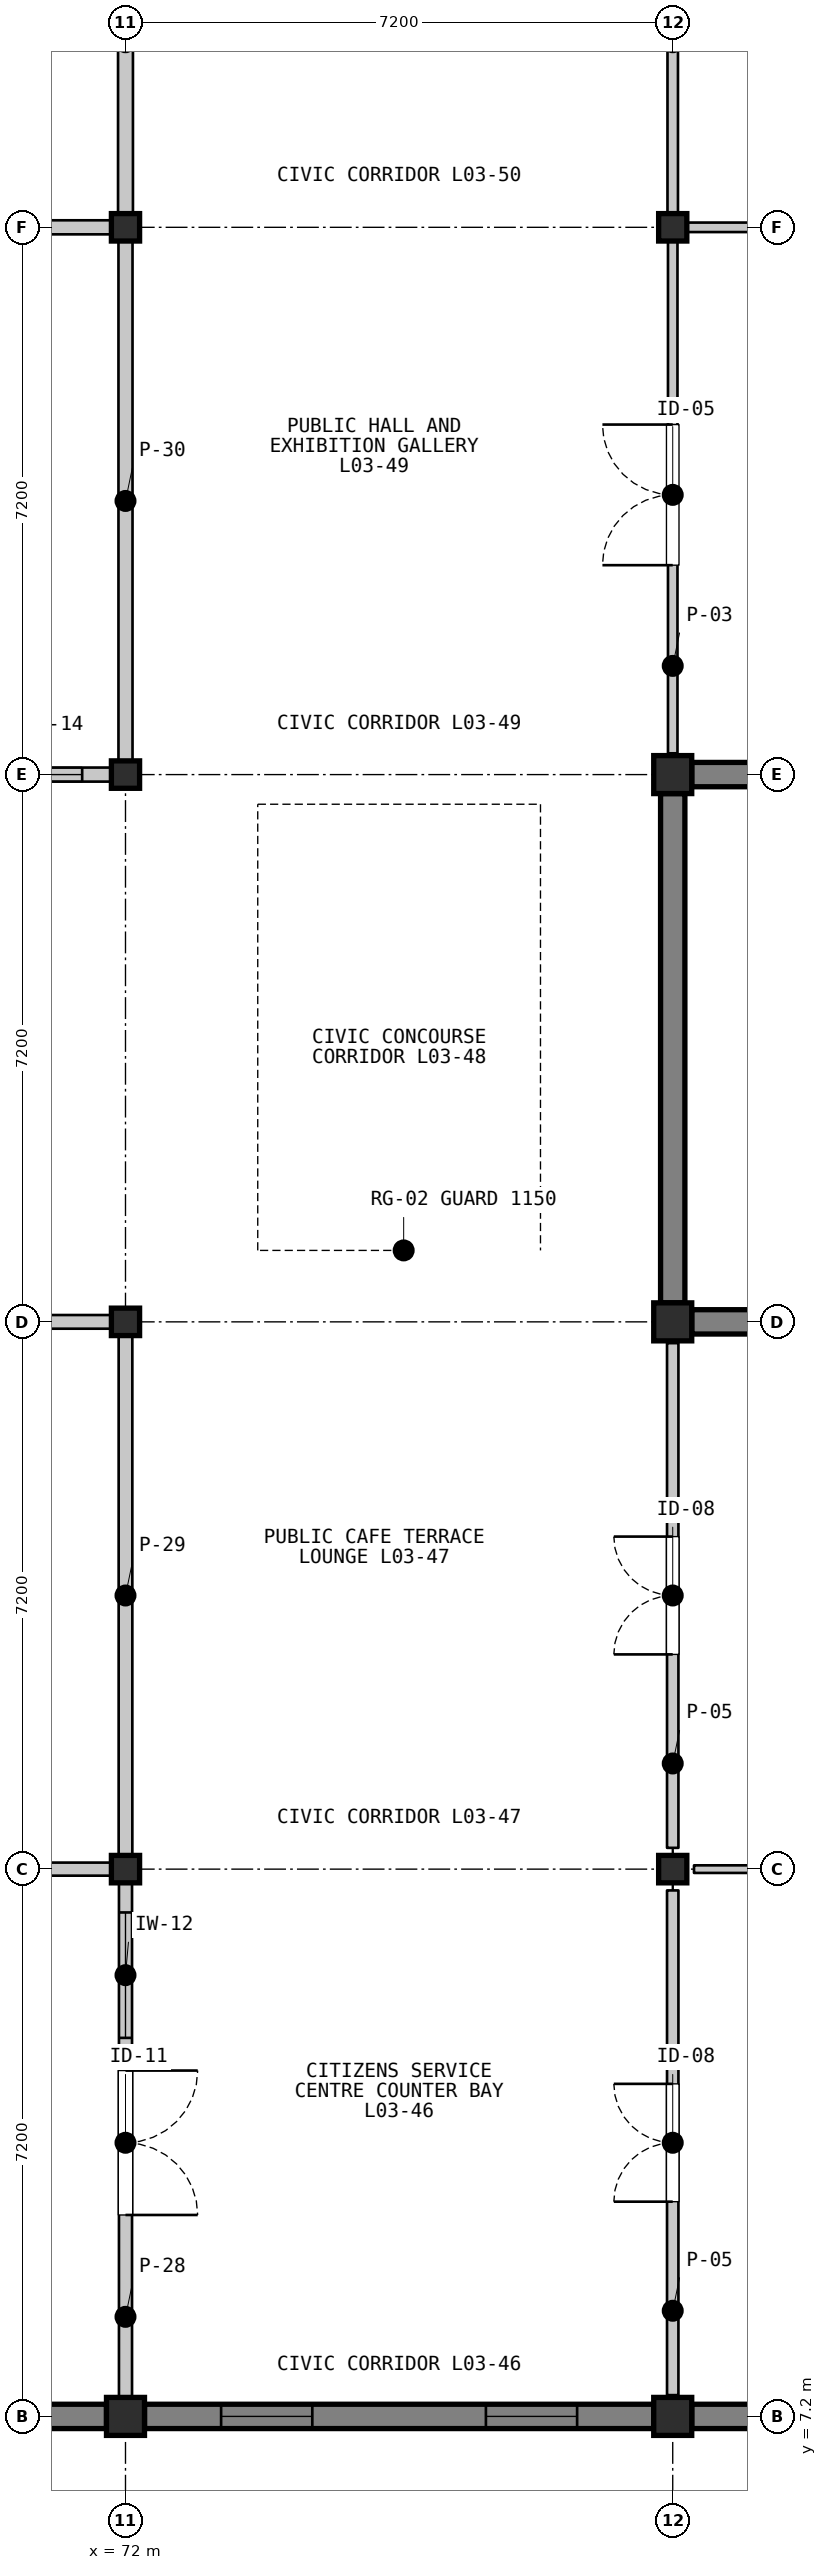
"""IFC4 building model, lengths in metres.
Left out: names, types, materials, properties, quantities, classifications, styles, units other than length and angle.
Written with IfcOpenShell. Run it as: python <this file> out.ifc"""

import sys

from ifc_helpers import new_model, si_unit, direction, frame, frame_2d, origin, origin_2d, place, context, subcontext, project, spatial, rectangle, i_section, extrude, element, fill, save


model = new_model("IFC4")
c1 = context("Model", 3, precision=1e-05, world=origin(), true_north=direction((0.0, 1.0)))
c2 = subcontext(c1, "Body", "Model", "MODEL_VIEW")
j1 = project(units=[si_unit("LENGTHUNIT", "METRE"), si_unit("PLANEANGLEUNIT", "RADIAN")], contexts=[c1])
p1 = place(None, origin())
s1 = spatial("IfcSite", under=j1, at=p1, CompositionType="ELEMENT")
p2 = place(p1, origin())
s2 = spatial("IfcBuilding", under=s1, at=p2, CompositionType="ELEMENT")
p3 = place(p2, frame((0.0, 0.0, 9.9)))
s3 = spatial("IfcBuildingStorey", under=s2, at=p3, CompositionType="ELEMENT", Elevation=9.9)
p4 = place(p3, frame((72.0, 7.2, 0.0), z_axis=(0.0, 0.0, 1.0), x_axis=(1.0, 0.0, 0.0)))
e1 = element("IfcColumn", 1, at=p4, inside=s3, PredefinedType="COLUMN", context=c2, shape_type="SweptSolid", body=[
    extrude(rectangle(XDim=0.5, YDim=0.5, at=origin_2d()), origin(), (0.0, 0.0, 1.0), 4.2),
])
for number, where, z_axis, x_axis in (
    (2, (72.0, 14.4, 0.0), (0.0, 0.0, 1.0), (1.0, 0.0, 0.0)),
    (3, (72.0, 21.6, 0.0), (0.0, 0.0, 1.0), (1.0, 0.0, 0.0)),
    (4, (72.0, 28.8, 0.0), (0.0, 0.0, 1.0), (1.0, 0.0, 0.0)),
    (5, (72.0, 36.0, 0.0), (0.0, 0.0, 1.0), (1.0, 0.0, 0.0)),
):
    element("IfcColumn", number, at=place(p3, frame(where, z_axis=z_axis, x_axis=x_axis)), inside=s3, PredefinedType="COLUMN", context=c2, shape_type="SweptSolid", body=[
        extrude(i_section(OverallWidth=0.371, OverallDepth=0.361, WebThickness=0.012, FlangeThickness=0.02, FilletRadius=0.015, at=origin_2d()), origin(), (0.0, 0.0, 1.0), 4.2),
    ])
p5 = place(p3, frame((79.2, 7.2, 0.0), z_axis=(0.0, 0.0, 1.0), x_axis=(1.0, 0.0, 0.0)))
e6 = element("IfcColumn", 6, at=p5, inside=s3, PredefinedType="COLUMN", context=c2, shape_type="SweptSolid", body=[
    extrude(rectangle(XDim=0.5, YDim=0.5, at=origin_2d()), origin(), (0.0, 0.0, 1.0), 4.2),
])
p6 = place(p3, frame((79.2, 14.4, 0.0), z_axis=(0.0, 0.0, 1.0), x_axis=(1.0, 0.0, 0.0)))
e7 = element("IfcColumn", 7, at=p6, inside=s3, PredefinedType="COLUMN", context=c2, shape_type="SweptSolid", body=[
    extrude(i_section(OverallWidth=0.371, OverallDepth=0.361, WebThickness=0.012, FlangeThickness=0.02, FilletRadius=0.015, at=origin_2d()), origin(), (0.0, 0.0, 1.0), 4.2),
])
for number, where, z_axis, x_axis in (
    (8, (79.2, 21.6, 0.0), (0.0, 0.0, 1.0), (1.0, 0.0, 0.0)),
    (9, (79.2, 28.8, 0.0), (0.0, 0.0, 1.0), (1.0, 0.0, 0.0)),
):
    element("IfcColumn", number, at=place(p3, frame(where, z_axis=z_axis, x_axis=x_axis)), inside=s3, PredefinedType="COLUMN", context=c2, shape_type="SweptSolid", body=[
        extrude(rectangle(XDim=0.5, YDim=0.5, at=origin_2d()), origin(), (0.0, 0.0, 1.0), 4.2),
    ])
p7 = place(p3, frame((79.2, 36.0, 0.0), z_axis=(0.0, 0.0, 1.0), x_axis=(1.0, 0.0, 0.0)))
e10 = element("IfcColumn", 10, at=p7, inside=s3, PredefinedType="COLUMN", context=c2, shape_type="SweptSolid", body=[
    extrude(i_section(OverallWidth=0.371, OverallDepth=0.361, WebThickness=0.012, FlangeThickness=0.02, FilletRadius=0.015, at=origin_2d()), origin(), (0.0, 0.0, 1.0), 4.2),
])
p8 = place(p3, frame((71.75, 7.2, 0.0), z_axis=(0.0, 0.0, 1.0), x_axis=(-1.0, 0.0, 0.0)))
e11 = element("IfcWall", 11, at=p8, inside=s3, PredefinedType="SOLIDWALL", context=c2, shape_type="SweptSolid", body=[
    extrude(rectangle(XDim=6.7, YDim=0.32, at=frame_2d((3.35, 0.0))), origin(), (0.0, 0.0, 1.0), 3.418),
])
p9 = place(p8, frame((1.008, 0.0, 0.95)))
e12 = element("IfcOpeningElement", 12, at=p9, cuts=e11, PredefinedType="OPENING", context=c2, shape_type="SweptSolid", body=[
    extrude(rectangle(XDim=1.2, YDim=1.7, at=frame_2d((0.6, 0.85))), frame((0.0, 0.17, 0.0), z_axis=(0.0, -1.0, 0.0), x_axis=(1.0, 0.0, 0.0)), (0.0, 0.0, 1.0), 0.34),
])
p10 = place(p8, frame((4.492, 0.0, 0.95)))
e13 = element("IfcOpeningElement", 13, at=p10, cuts=e11, PredefinedType="OPENING", context=c2, shape_type="SweptSolid", body=[
    extrude(rectangle(XDim=1.2, YDim=1.7, at=frame_2d((0.6, 0.85))), frame((0.0, 0.17, 0.0), z_axis=(0.0, -1.0, 0.0), x_axis=(1.0, 0.0, 0.0)), (0.0, 0.0, 1.0), 0.34),
])
p11 = place(p3, frame((78.95, 7.2, 0.0), z_axis=(0.0, 0.0, 1.0), x_axis=(-1.0, 0.0, 0.0)))
e14 = element("IfcWall", 14, at=p11, inside=s3, PredefinedType="SOLIDWALL", context=c2, shape_type="SweptSolid", body=[
    extrude(rectangle(XDim=6.7, YDim=0.32, at=frame_2d((3.35, 0.0))), origin(), (0.0, 0.0, 1.0), 3.418),
])
p12 = place(p11, frame((1.008, 0.0, 0.95)))
e15 = element("IfcOpeningElement", 15, at=p12, cuts=e14, PredefinedType="OPENING", context=c2, shape_type="SweptSolid", body=[
    extrude(rectangle(XDim=1.2, YDim=1.7, at=frame_2d((0.6, 0.85))), frame((0.0, 0.17, 0.0), z_axis=(0.0, -1.0, 0.0), x_axis=(1.0, 0.0, 0.0)), (0.0, 0.0, 1.0), 0.34),
])
p13 = place(p11, frame((4.492, 0.0, 0.95)))
e16 = element("IfcOpeningElement", 16, at=p13, cuts=e14, PredefinedType="OPENING", context=c2, shape_type="SweptSolid", body=[
    extrude(rectangle(XDim=1.2, YDim=1.7, at=frame_2d((0.6, 0.85))), frame((0.0, 0.17, 0.0), z_axis=(0.0, -1.0, 0.0), x_axis=(1.0, 0.0, 0.0)), (0.0, 0.0, 1.0), 0.34),
])
p14 = place(p3, frame((79.2, 28.55, 0.0), z_axis=(0.0, 0.0, 1.0), x_axis=(0.0, -1.0, 0.0)))
e17 = element("IfcWall", 17, at=p14, inside=s3, PredefinedType="SOLIDWALL", context=c2, shape_type="SweptSolid", body=[
    extrude(rectangle(XDim=6.7, YDim=0.32, at=frame_2d((3.35, 0.0))), origin(), (0.0, 0.0, 1.0), 3.487),
])
p15 = place(p3, frame((86.15, 7.2, 0.0), z_axis=(0.0, 0.0, 1.0), x_axis=(-1.0, 0.0, 0.0)))
e18 = element("IfcWall", 18, at=p15, inside=s3, PredefinedType="SOLIDWALL", context=c2, shape_type="SweptSolid", body=[
    extrude(rectangle(XDim=6.7, YDim=0.32, at=frame_2d((3.35, 0.0))), origin(), (0.0, 0.0, 1.0), 3.418),
])
p16 = place(p15, frame((1.008, 0.0, 0.95)))
e19 = element("IfcOpeningElement", 19, at=p16, cuts=e18, PredefinedType="OPENING", context=c2, shape_type="SweptSolid", body=[
    extrude(rectangle(XDim=1.2, YDim=1.7, at=frame_2d((0.6, 0.85))), frame((0.0, 0.17, 0.0), z_axis=(0.0, -1.0, 0.0), x_axis=(1.0, 0.0, 0.0)), (0.0, 0.0, 1.0), 0.34),
])
p17 = place(p15, frame((4.492, 0.0, 0.95)))
e20 = element("IfcOpeningElement", 20, at=p17, cuts=e18, PredefinedType="OPENING", context=c2, shape_type="SweptSolid", body=[
    extrude(rectangle(XDim=1.2, YDim=1.7, at=frame_2d((0.6, 0.85))), frame((0.0, 0.17, 0.0), z_axis=(0.0, -1.0, 0.0), x_axis=(1.0, 0.0, 0.0)), (0.0, 0.0, 1.0), 0.34),
])
p18 = place(p3, frame((79.45, 21.6, 0.0), z_axis=(0.0, 0.0, 1.0), x_axis=(1.0, 0.0, 0.0)))
e21 = element("IfcWall", 21, at=p18, inside=s3, PredefinedType="SOLIDWALL", context=c2, shape_type="SweptSolid", body=[
    extrude(rectangle(XDim=6.7, YDim=0.32, at=frame_2d((3.35, 0.0))), origin(), (0.0, 0.0, 1.0), 3.418),
])
p19 = place(p18, frame((0.908, 0.0, 0.95)))
e22 = element("IfcOpeningElement", 22, at=p19, cuts=e21, PredefinedType="OPENING", context=c2, shape_type="SweptSolid", body=[
    extrude(rectangle(XDim=1.4, YDim=2.1, at=frame_2d((0.7, 1.05))), frame((0.0, 0.17, 0.0), z_axis=(0.0, -1.0, 0.0), x_axis=(1.0, 0.0, 0.0)), (0.0, 0.0, 1.0), 0.34),
])
p20 = place(p18, frame((4.392, 0.0, 0.95)))
e23 = element("IfcOpeningElement", 23, at=p20, cuts=e21, PredefinedType="OPENING", context=c2, shape_type="SweptSolid", body=[
    extrude(rectangle(XDim=1.4, YDim=2.1, at=frame_2d((0.7, 1.05))), frame((0.0, 0.17, 0.0), z_axis=(0.0, -1.0, 0.0), x_axis=(1.0, 0.0, 0.0)), (0.0, 0.0, 1.0), 0.34),
])
p21 = place(p3, frame((86.15, 28.8, 0.0), z_axis=(0.0, 0.0, 1.0), x_axis=(-1.0, 0.0, 0.0)))
e24 = element("IfcWall", 24, at=p21, inside=s3, PredefinedType="SOLIDWALL", context=c2, shape_type="SweptSolid", body=[
    extrude(rectangle(XDim=6.7, YDim=0.32, at=frame_2d((3.35, 0.0))), origin(), (0.0, 0.0, 1.0), 3.418),
])
p22 = place(p21, frame((1.008, 0.0, 0.95)))
e25 = element("IfcOpeningElement", 25, at=p22, cuts=e24, PredefinedType="OPENING", context=c2, shape_type="SweptSolid", body=[
    extrude(rectangle(XDim=1.2, YDim=1.7, at=frame_2d((0.6, 0.85))), frame((0.0, 0.17, 0.0), z_axis=(0.0, -1.0, 0.0), x_axis=(1.0, 0.0, 0.0)), (0.0, 0.0, 1.0), 0.34),
])
p23 = place(p21, frame((4.492, 0.0, 0.95)))
e26 = element("IfcOpeningElement", 26, at=p23, cuts=e24, PredefinedType="OPENING", context=c2, shape_type="SweptSolid", body=[
    extrude(rectangle(XDim=1.2, YDim=1.7, at=frame_2d((0.6, 0.85))), frame((0.0, 0.17, 0.0), z_axis=(0.0, -1.0, 0.0), x_axis=(1.0, 0.0, 0.0)), (0.0, 0.0, 1.0), 0.34),
])
p24 = place(p3, frame((72.0, 14.28, 0.0), z_axis=(0.0, 0.0, 1.0), x_axis=(0.0, -1.0, 0.0)))
e27 = element("IfcWall", 27, at=p24, inside=s3, PredefinedType="PARTITIONING", context=c2, shape_type="SweptSolid", body=[
    extrude(rectangle(XDim=6.96, YDim=0.172, at=frame_2d((3.48, 0.0))), origin(), (0.0, 0.0, 1.0), 3.408),
])
p25 = place(p24, frame((2.53, 0.0, 0.0)))
e28 = element("IfcOpeningElement", 28, at=p25, cuts=e27, PredefinedType="OPENING", context=c2, shape_type="SweptSolid", body=[
    extrude(rectangle(XDim=1.9, YDim=2.45, at=frame_2d((0.95, 1.225))), frame((0.0, 0.096, 0.0), z_axis=(0.0, -1.0, 0.0), x_axis=(1.0, 0.0, 0.0)), (0.0, 0.0, 1.0), 0.192),
])
p26 = place(p24, frame((0.45, 0.0, 1.05)))
e29 = element("IfcOpeningElement", 29, at=p26, cuts=e27, PredefinedType="OPENING", context=c2, shape_type="SweptSolid", body=[
    extrude(rectangle(XDim=1.65, YDim=1.15, at=frame_2d((0.825, 0.575))), frame((0.0, 0.096, 0.0), z_axis=(0.0, -1.0, 0.0), x_axis=(1.0, 0.0, 0.0)), (0.0, 0.0, 1.0), 0.192),
])
p27 = place(p3, frame((64.92, 14.4, 0.0), z_axis=(0.0, 0.0, 1.0), x_axis=(1.0, 0.0, 0.0)))
e30 = element("IfcWall", 30, at=p27, inside=s3, PredefinedType="PARTITIONING", context=c2, shape_type="SweptSolid", body=[
    extrude(rectangle(XDim=6.96, YDim=0.172, at=frame_2d((3.48, 0.0))), origin(), (0.0, 0.0, 1.0), 3.408),
])
p28 = place(p3, frame((64.92, 21.6, 0.0), z_axis=(0.0, 0.0, 1.0), x_axis=(1.0, 0.0, 0.0)))
e31 = element("IfcWall", 31, at=p28, inside=s3, PredefinedType="PARTITIONING", context=c2, shape_type="SweptSolid", body=[
    extrude(rectangle(XDim=6.96, YDim=0.18, at=frame_2d((3.48, 0.0))), origin(), (0.0, 0.0, 1.0), 3.408),
])
p29 = place(p28, frame((2.705, 0.0, 0.0)))
e32 = element("IfcOpeningElement", 32, at=p29, cuts=e31, PredefinedType="OPENING", context=c2, shape_type="SweptSolid", body=[
    extrude(rectangle(XDim=1.55, YDim=2.3, at=frame_2d((0.775, 1.15))), frame((0.0, 0.1, 0.0), z_axis=(0.0, -1.0, 0.0), x_axis=(1.0, 0.0, 0.0)), (0.0, 0.0, 1.0), 0.2),
])
p30 = place(p28, frame((0.45, 0.0, 1.05)))
e33 = element("IfcOpeningElement", 33, at=p30, cuts=e31, PredefinedType="OPENING", context=c2, shape_type="SweptSolid", body=[
    extrude(rectangle(XDim=1.7, YDim=1.18, at=frame_2d((0.85, 0.59))), frame((0.0, 0.1, 0.0), z_axis=(0.0, -1.0, 0.0), x_axis=(1.0, 0.0, 0.0)), (0.0, 0.0, 1.0), 0.2),
])
p31 = place(p3, frame((72.0, 21.48, 0.0), z_axis=(0.0, 0.0, 1.0), x_axis=(0.0, -1.0, 0.0)))
e34 = element("IfcWall", 34, at=p31, inside=s3, PredefinedType="PARTITIONING", context=c2, shape_type="SweptSolid", body=[
    extrude(rectangle(XDim=6.96, YDim=0.18, at=frame_2d((3.48, 0.0))), origin(), (0.0, 0.0, 1.0), 3.408),
])
p32 = place(p3, frame((71.88, 28.8, 0.0), z_axis=(0.0, 0.0, 1.0), x_axis=(-1.0, 0.0, 0.0)))
e35 = element("IfcWall", 35, at=p32, inside=s3, PredefinedType="PARTITIONING", context=c2, shape_type="SweptSolid", body=[
    extrude(rectangle(XDim=6.96, YDim=0.185, at=frame_2d((3.48, 0.0))), origin(), (0.0, 0.0, 1.0), 3.408),
])
p33 = place(p32, frame((2.705, 0.0, 0.0)))
e36 = element("IfcOpeningElement", 36, at=p33, cuts=e35, PredefinedType="OPENING", context=c2, shape_type="SweptSolid", body=[
    extrude(rectangle(XDim=1.55, YDim=2.3, at=frame_2d((0.775, 1.15))), frame((0.0, 0.103, 0.0), z_axis=(0.0, -1.0, 0.0), x_axis=(1.0, 0.0, 0.0)), (0.0, 0.0, 1.0), 0.205),
])
p34 = place(p32, frame((0.45, 0.0, 1.05)))
e37 = element("IfcOpeningElement", 37, at=p34, cuts=e35, PredefinedType="OPENING", context=c2, shape_type="SweptSolid", body=[
    extrude(rectangle(XDim=1.75, YDim=1.18, at=frame_2d((0.875, 0.59))), frame((0.0, 0.103, 0.0), z_axis=(0.0, -1.0, 0.0), x_axis=(1.0, 0.0, 0.0)), (0.0, 0.0, 1.0), 0.205),
])
for number, where, z_axis, x_axis in (
    (38, (64.92, 36.0, 0.0), (0.0, 0.0, 1.0), (1.0, 0.0, 0.0)),
    (39, (72.0, 35.88, 0.0), (0.0, 0.0, 1.0), (0.0, -1.0, 0.0)),
):
    element("IfcWall", number, at=place(p3, frame(where, z_axis=z_axis, x_axis=x_axis)), inside=s3, PredefinedType="PARTITIONING", context=c2, shape_type="SweptSolid", body=[
        extrude(rectangle(XDim=6.96, YDim=0.185, at=frame_2d((3.48, 0.0))), origin(), (0.0, 0.0, 1.0), 3.408),
    ])
p35 = place(p3, frame((72.0, 43.08, 0.0), z_axis=(0.0, 0.0, 1.0), x_axis=(0.0, -1.0, 0.0)))
e40 = element("IfcWall", 40, at=p35, inside=s3, PredefinedType="PARTITIONING", context=c2, shape_type="SweptSolid", body=[
    extrude(rectangle(XDim=6.96, YDim=0.196, at=frame_2d((3.48, 0.0))), origin(), (0.0, 0.0, 1.0), 3.408),
])
p36 = place(p3, frame((79.2, 7.48, 0.0), z_axis=(0.0, 0.0, 1.0), x_axis=(0.0, 1.0, 0.0)))
e41 = element("IfcWall", 41, at=p36, inside=s3, PredefinedType="PARTITIONING", context=c2, shape_type="SweptSolid", body=[
    extrude(rectangle(XDim=6.64, YDim=0.15, at=frame_2d((3.32, 0.0))), origin(), (0.0, 0.0, 1.0), 3.477),
])
p37 = place(p36, frame((2.545, 0.0, 0.0)))
e42 = element("IfcOpeningElement", 42, at=p37, cuts=e41, PredefinedType="OPENING", context=c2, shape_type="SweptSolid", body=[
    extrude(rectangle(XDim=1.55, YDim=2.3, at=frame_2d((0.775, 1.15))), frame((0.0, 0.085, 0.0), z_axis=(0.0, -1.0, 0.0), x_axis=(1.0, 0.0, 0.0)), (0.0, 0.0, 1.0), 0.17),
])
p38 = place(p3, frame((79.48, 14.4, 0.0), z_axis=(0.0, 0.0, 1.0), x_axis=(1.0, 0.0, 0.0)))
e43 = element("IfcWall", 43, at=p38, inside=s3, PredefinedType="PARTITIONING", context=c2, shape_type="SweptSolid", body=[
    extrude(rectangle(XDim=6.64, YDim=0.1, at=frame_2d((3.32, 0.0))), origin(), (0.0, 0.0, 1.0), 3.408),
])
p39 = place(p3, frame((79.2, 14.68, 0.0), z_axis=(0.0, 0.0, 1.0), x_axis=(0.0, 1.0, 0.0)))
e44 = element("IfcWall", 44, at=p39, inside=s3, PredefinedType="PARTITIONING", context=c2, shape_type="SweptSolid", body=[
    extrude(rectangle(XDim=6.64, YDim=0.15, at=frame_2d((3.32, 0.0))), origin(), (0.0, 0.0, 1.0), 3.477),
])
p40 = place(p39, frame((2.545, 0.0, 0.0)))
e45 = element("IfcOpeningElement", 45, at=p40, cuts=e44, PredefinedType="OPENING", context=c2, shape_type="SweptSolid", body=[
    extrude(rectangle(XDim=1.55, YDim=2.3, at=frame_2d((0.775, 1.15))), frame((0.0, 0.085, 0.0), z_axis=(0.0, -1.0, 0.0), x_axis=(1.0, 0.0, 0.0)), (0.0, 0.0, 1.0), 0.17),
])
p41 = place(p3, frame((79.2, 29.08, 0.0), z_axis=(0.0, 0.0, 1.0), x_axis=(0.0, 1.0, 0.0)))
e46 = element("IfcWall", 46, at=p41, inside=s3, PredefinedType="PARTITIONING", context=c2, shape_type="SweptSolid", body=[
    extrude(rectangle(XDim=6.8, YDim=0.125, at=frame_2d((3.4, 0.0))), origin(), (0.0, 0.0, 1.0), 3.408),
])
p42 = place(p41, frame((2.475, 0.0, 0.0)))
e47 = element("IfcOpeningElement", 47, at=p42, cuts=e46, PredefinedType="OPENING", context=c2, shape_type="SweptSolid", body=[
    extrude(rectangle(XDim=1.85, YDim=2.45, at=frame_2d((0.925, 1.225))), frame((0.0, 0.073, 0.0), z_axis=(0.0, -1.0, 0.0), x_axis=(1.0, 0.0, 0.0)), (0.0, 0.0, 1.0), 0.145),
])
p43 = place(p3, frame((79.32, 36.0, 0.0), z_axis=(0.0, 0.0, 1.0), x_axis=(1.0, 0.0, 0.0)))
e48 = element("IfcWall", 48, at=p43, inside=s3, PredefinedType="PARTITIONING", context=c2, shape_type="SweptSolid", body=[
    extrude(rectangle(XDim=6.96, YDim=0.125, at=frame_2d((3.48, 0.0))), origin(), (0.0, 0.0, 1.0), 3.408),
])
p44 = place(p3, frame((79.2, 36.12, 0.0), z_axis=(0.0, 0.0, 1.0), x_axis=(0.0, 1.0, 0.0)))
e49 = element("IfcWall", 49, at=p44, inside=s3, PredefinedType="PARTITIONING", context=c2, shape_type="SweptSolid", body=[
    extrude(rectangle(XDim=6.8, YDim=0.138, at=frame_2d((3.4, 0.0))), origin(), (0.0, 0.0, 1.0), 3.408),
])
p45 = place(p12, origin())
e50 = element("IfcWindow", 50, at=p45, inside=s3, PartitioningType="SINGLE_PANEL", PredefinedType="WINDOW", context=c2, shape_type="SweptSolid", body=[
    extrude(rectangle(XDim=1.2, YDim=1.7, at=frame_2d((0.6, 0.85))), frame((0.0, 0.03, 0.0), z_axis=(0.0, -1.0, 0.0), x_axis=(1.0, 0.0, 0.0)), (0.0, 0.0, 1.0), 0.06),
])
fill(e15, e50)
p46 = place(p13, origin())
e51 = element("IfcWindow", 51, at=p46, inside=s3, PartitioningType="SINGLE_PANEL", PredefinedType="WINDOW", context=c2, shape_type="SweptSolid", body=[
    extrude(rectangle(XDim=1.2, YDim=1.7, at=frame_2d((0.6, 0.85))), frame((0.0, 0.03, 0.0), z_axis=(0.0, -1.0, 0.0), x_axis=(1.0, 0.0, 0.0)), (0.0, 0.0, 1.0), 0.06),
])
fill(e16, e51)
p47 = place(p25, origin())
e52 = element("IfcDoor", 52, at=p47, inside=s3, OperationType="DOUBLE_DOOR_SINGLE_SWING", PredefinedType="DOOR", context=c2, shape_type="SweptSolid", body=[
    extrude(rectangle(XDim=1.9, YDim=2.45, at=frame_2d((0.95, 1.225))), frame((0.0, 0.025, 0.0), z_axis=(0.0, -1.0, 0.0), x_axis=(1.0, 0.0, 0.0)), (0.0, 0.0, 1.0), 0.05),
])
fill(e28, e52)
p48 = place(p26, origin())
e53 = element("IfcWindow", 53, at=p48, inside=s3, PartitioningType="SINGLE_PANEL", PredefinedType="WINDOW", context=c2, shape_type="SweptSolid", body=[
    extrude(rectangle(XDim=1.65, YDim=1.15, at=frame_2d((0.825, 0.575))), frame((0.0, 0.03, 0.0), z_axis=(0.0, -1.0, 0.0), x_axis=(1.0, 0.0, 0.0)), (0.0, 0.0, 1.0), 0.06),
])
fill(e29, e53)
p49 = place(p34, origin())
e54 = element("IfcWindow", 54, at=p49, inside=s3, PartitioningType="SINGLE_PANEL", PredefinedType="WINDOW", context=c2, shape_type="SweptSolid", body=[
    extrude(rectangle(XDim=1.75, YDim=1.18, at=frame_2d((0.875, 0.59))), frame((0.0, 0.03, 0.0), z_axis=(0.0, -1.0, 0.0), x_axis=(1.0, 0.0, 0.0)), (0.0, 0.0, 1.0), 0.06),
])
fill(e37, e54)
p50 = place(p37, origin())
e55 = element("IfcDoor", 55, at=p50, inside=s3, OperationType="DOUBLE_DOOR_SINGLE_SWING", PredefinedType="DOOR", context=c2, shape_type="SweptSolid", body=[
    extrude(rectangle(XDim=1.55, YDim=2.3, at=frame_2d((0.775, 1.15))), frame((0.0, 0.025, 0.0), z_axis=(0.0, -1.0, 0.0), x_axis=(1.0, 0.0, 0.0)), (0.0, 0.0, 1.0), 0.05),
])
fill(e42, e55)
p51 = place(p40, origin())
e56 = element("IfcDoor", 56, at=p51, inside=s3, OperationType="DOUBLE_DOOR_SINGLE_SWING", PredefinedType="DOOR", context=c2, shape_type="SweptSolid", body=[
    extrude(rectangle(XDim=1.55, YDim=2.3, at=frame_2d((0.775, 1.15))), frame((0.0, 0.025, 0.0), z_axis=(0.0, -1.0, 0.0), x_axis=(1.0, 0.0, 0.0)), (0.0, 0.0, 1.0), 0.05),
])
fill(e45, e56)
p52 = place(p42, origin())
e57 = element("IfcDoor", 57, at=p52, inside=s3, OperationType="DOUBLE_DOOR_SINGLE_SWING", PredefinedType="DOOR", context=c2, shape_type="SweptSolid", body=[
    extrude(rectangle(XDim=1.85, YDim=2.45, at=frame_2d((0.925, 1.225))), frame((0.0, 0.025, 0.0), z_axis=(0.0, -1.0, 0.0), x_axis=(1.0, 0.0, 0.0)), (0.0, 0.0, 1.0), 0.05),
])
fill(e47, e57)
save(model, sys.argv[1])
